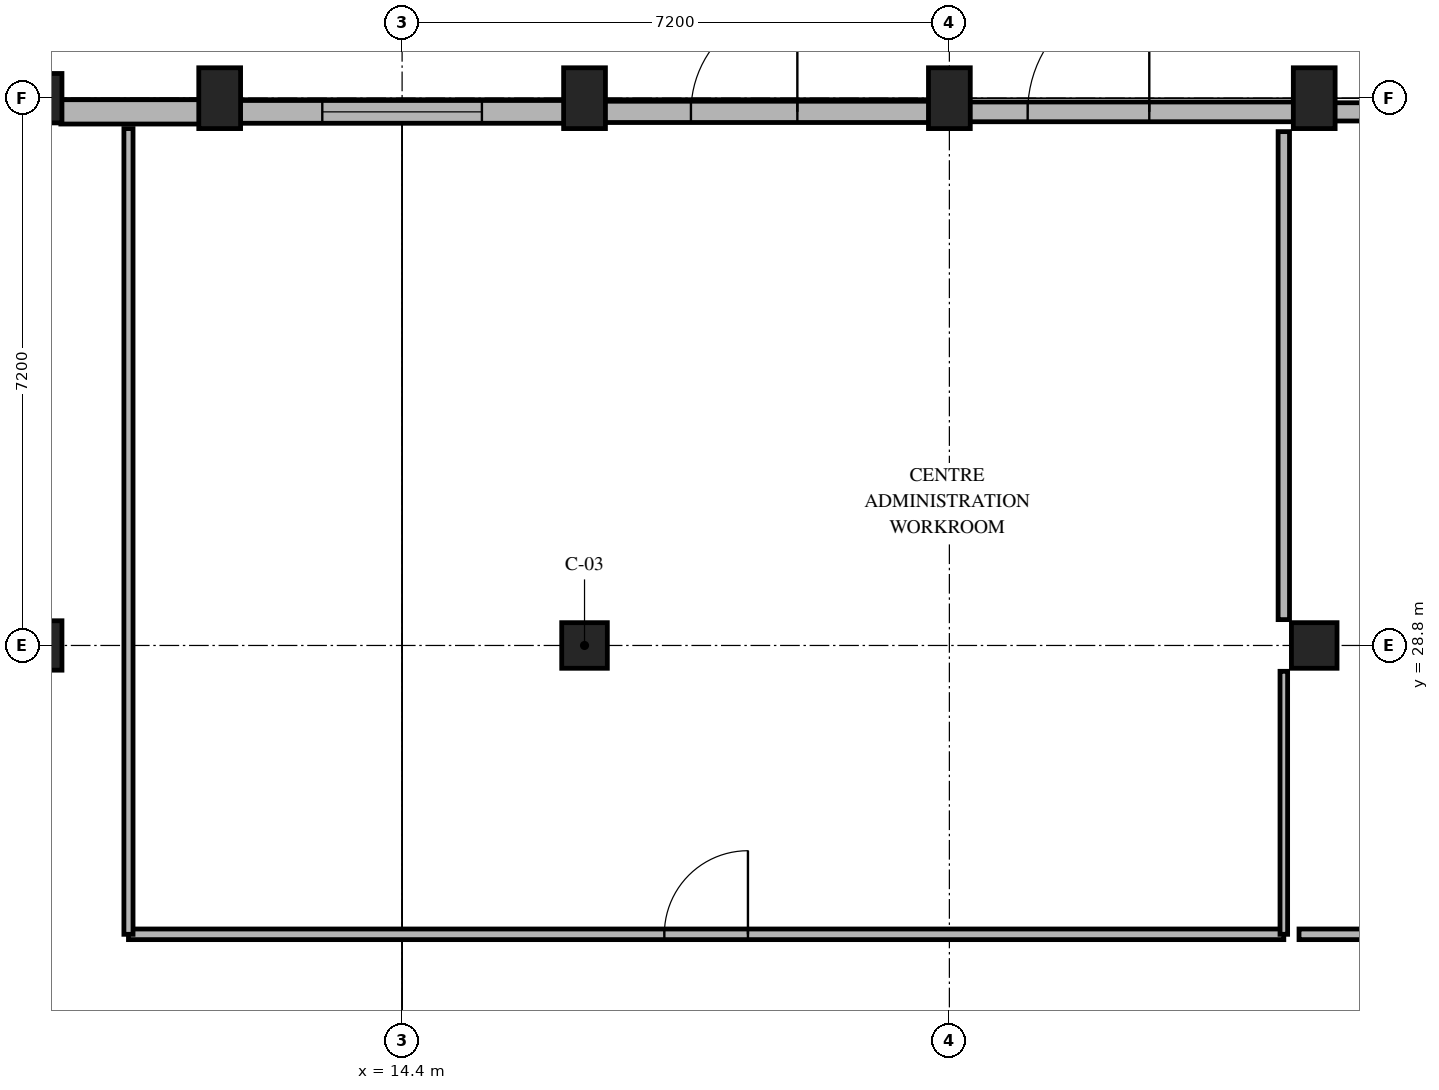
"""IFC4 building model, lengths in metres.
Left out: names, types, materials, properties, quantities, classifications, styles, units other than length and angle.
Written with IfcOpenShell. Run it as: python <this file> out.ifc"""

import sys

from ifc_helpers import new_model, si_unit, direction, frame, frame_2d, origin, origin_2d, place, context, subcontext, project, spatial, rectangle, extrude, element, fill, save


model = new_model("IFC4")
c1 = context("Model", 3, precision=1e-05, world=origin(), true_north=direction((0.0, 1.0)))
c2 = subcontext(c1, "Body", "Model", "MODEL_VIEW")
j1 = project(units=[si_unit("LENGTHUNIT", "METRE"), si_unit("PLANEANGLEUNIT", "RADIAN")], contexts=[c1])
p1 = place(None, origin())
s1 = spatial("IfcSite", under=j1, at=p1, CompositionType="ELEMENT")
p2 = place(p1, origin())
s2 = spatial("IfcBuilding", under=s1, at=p2, CompositionType="ELEMENT")
p3 = place(p2, origin())
s3 = spatial("IfcBuildingStorey", under=s2, at=p3, CompositionType="ELEMENT", Elevation=0.0)
for number, where, z_axis, x_axis in (
    (1, (9.6, 28.8, 0.0), (0.0, 0.0, 1.0), (1.0, 0.0, 0.0)),
    (2, (9.6, 36.0, 0.0), (0.0, 0.0, 1.0), (1.0, 0.0, 0.0)),
):
    element("IfcColumn", number, at=place(p3, frame(where, z_axis=z_axis, x_axis=x_axis)), inside=s3, PredefinedType="COLUMN", context=c2, shape_type="SweptSolid", body=[
        extrude(rectangle(XDim=0.65, YDim=0.65, at=origin_2d()), origin(), (0.0, 0.0, 1.0), 4.5),
    ])
for number, where, z_axis, x_axis in (
    (3, (12.0, 36.0, 0.0), (0.0, 0.0, 1.0), (1.0, 0.0, 0.0)),
    (4, (16.8, 36.0, 0.0), (0.0, 0.0, 1.0), (1.0, 0.0, 0.0)),
    (5, (21.6, 36.0, 0.0), (0.0, 0.0, 1.0), (1.0, 0.0, 0.0)),
    (6, (26.4, 36.0, 0.0), (0.0, 0.0, 1.0), (1.0, 0.0, 0.0)),
):
    element("IfcColumn", number, at=place(p3, frame(where, z_axis=z_axis, x_axis=x_axis)), inside=s3, PredefinedType="COLUMN", context=c2, shape_type="SweptSolid", body=[
        extrude(rectangle(XDim=0.55, YDim=0.8, at=origin_2d()), origin(), (0.0, 0.0, 1.0), 4.5),
    ])
for number, where, z_axis, x_axis in (
    (7, (16.8, 28.8, 0.0), (0.0, 0.0, 1.0), (1.0, 0.0, 0.0)),
    (8, (26.4, 28.8, 0.0), (0.0, 0.0, 1.0), (1.0, 0.0, 0.0)),
):
    element("IfcColumn", number, at=place(p3, frame(where, z_axis=z_axis, x_axis=x_axis)), inside=s3, PredefinedType="COLUMN", context=c2, shape_type="SweptSolid", body=[
        extrude(rectangle(XDim=0.6, YDim=0.6, at=origin_2d()), origin(), (0.0, 0.0, 1.0), 4.5),
    ])
p4 = place(p3, frame((9.91, 35.82, 0.0), z_axis=(0.0, 0.0, 1.0), x_axis=(1.0, 0.0, 0.0)))
e9 = element("IfcWall", 9, at=p4, inside=s3, PredefinedType="SOLIDWALL", context=c2, shape_type="SweptSolid", body=[
    extrude(rectangle(XDim=1.83, YDim=0.32, at=frame_2d((0.915, 0.0))), origin(), (0.0, 0.0, 1.0), 3.59),
])
p5 = place(p3, frame((12.26, 35.82, 0.0), z_axis=(0.0, 0.0, 1.0), x_axis=(1.0, 0.0, 0.0)))
e10 = element("IfcWall", 10, at=p5, inside=s3, PredefinedType="SOLIDWALL", context=c2, shape_type="SweptSolid", body=[
    extrude(rectangle(XDim=4.28, YDim=0.3, at=frame_2d((2.14, 0.0))), origin(), (0.0, 0.0, 1.0), 3.64),
])
p6 = place(p5, frame((1.09, 0.0, 0.9)))
e11 = element("IfcOpeningElement", 11, at=p6, cuts=e10, PredefinedType="OPENING", context=c2, shape_type="SweptSolid", body=[
    extrude(rectangle(XDim=2.1, YDim=1.35, at=frame_2d((1.05, 0.675))), frame((0.0, 0.16, 0.0), z_axis=(0.0, -1.0, 0.0), x_axis=(1.0, 0.0, 0.0)), (0.0, 0.0, 1.0), 0.32),
])
p7 = place(p3, frame((17.06, 35.82, 0.0), z_axis=(0.0, 0.0, 1.0), x_axis=(1.0, 0.0, 0.0)))
e12 = element("IfcWall", 12, at=p7, inside=s3, PredefinedType="SOLIDWALL", context=c2, shape_type="SweptSolid", body=[
    extrude(rectangle(XDim=4.28, YDim=0.28, at=frame_2d((2.14, 0.0))), origin(), (0.0, 0.0, 1.0), 3.44),
])
p8 = place(p7, frame((1.14, 0.0, 0.0)))
e13 = element("IfcOpeningElement", 13, at=p8, cuts=e12, PredefinedType="OPENING", context=c2, shape_type="SweptSolid", body=[
    extrude(rectangle(XDim=1.4, YDim=2.2, at=frame_2d((0.7, 1.1))), frame((0.0, 0.15, 0.0), z_axis=(0.0, -1.0, 0.0), x_axis=(1.0, 0.0, 0.0)), (0.0, 0.0, 1.0), 0.3),
])
p9 = place(p3, frame((21.86, 35.82, 0.0), z_axis=(0.0, 0.0, 1.0), x_axis=(1.0, 0.0, 0.0)))
e14 = element("IfcWall", 14, at=p9, inside=s3, PredefinedType="SOLIDWALL", context=c2, shape_type="SweptSolid", body=[
    extrude(rectangle(XDim=4.28, YDim=0.26, at=frame_2d((2.14, 0.0))), origin(), (0.0, 0.0, 1.0), 3.49),
])
p10 = place(p9, frame((0.77, 0.0, 0.0)))
e15 = element("IfcOpeningElement", 15, at=p10, cuts=e14, PredefinedType="OPENING", context=c2, shape_type="SweptSolid", body=[
    extrude(rectangle(XDim=1.6, YDim=2.3, at=frame_2d((0.8, 1.15))), frame((0.0, 0.14, 0.0), z_axis=(0.0, -1.0, 0.0), x_axis=(1.0, 0.0, 0.0)), (0.0, 0.0, 1.0), 0.28),
])
p11 = place(p3, frame((26.66, 35.82, 0.0), z_axis=(0.0, 0.0, 1.0), x_axis=(1.0, 0.0, 0.0)))
e16 = element("IfcWall", 16, at=p11, inside=s3, PredefinedType="SOLIDWALL", context=c2, shape_type="SweptSolid", body=[
    extrude(rectangle(XDim=4.28, YDim=0.24, at=frame_2d((2.14, 0.0))), origin(), (0.0, 0.0, 1.0), 3.54),
])
p12 = place(p11, frame((0.82, 0.0, 0.0)))
e17 = element("IfcOpeningElement", 17, at=p12, cuts=e16, PredefinedType="OPENING", context=c2, shape_type="SweptSolid", body=[
    extrude(rectangle(XDim=1.4, YDim=2.2, at=frame_2d((0.7, 1.1))), frame((0.0, 0.13, 0.0), z_axis=(0.0, -1.0, 0.0), x_axis=(1.0, 0.0, 0.0)), (0.0, 0.0, 1.0), 0.26),
])
p13 = place(p3, frame((10.8, 25.0, 0.0), z_axis=(0.0, 0.0, 1.0), x_axis=(1.0, 0.0, 0.0)))
e18 = element("IfcWall", 18, at=p13, inside=s3, PredefinedType="PARTITIONING", context=c2, shape_type="SweptSolid", body=[
    extrude(rectangle(XDim=15.2, YDim=0.14, at=frame_2d((7.6, 0.0))), origin(), (0.0, 0.0, 1.0), 3.44),
])
p14 = place(p13, frame((7.05, 0.0, 0.0)))
e19 = element("IfcOpeningElement", 19, at=p14, cuts=e18, PredefinedType="OPENING", context=c2, shape_type="SweptSolid", body=[
    extrude(rectangle(XDim=1.1, YDim=2.15, at=frame_2d((0.55, 1.075))), frame((0.0, 0.08, 0.0), z_axis=(0.0, -1.0, 0.0), x_axis=(1.0, 0.0, 0.0)), (0.0, 0.0, 1.0), 0.16),
])
p15 = place(p3, frame((10.8, 35.6, 0.0), z_axis=(0.0, 0.0, 1.0), x_axis=(0.0, -1.0, 0.0)))
e20 = element("IfcWall", 20, at=p15, inside=s3, PredefinedType="PARTITIONING", context=c2, shape_type="SweptSolid", body=[
    extrude(rectangle(XDim=10.6, YDim=0.12, at=frame_2d((5.3, 0.0))), origin(), (0.0, 0.0, 1.0), 3.49),
])
p16 = place(p3, frame((26.0, 25.0, 0.0), z_axis=(0.0, 0.0, 1.0), x_axis=(0.0, 1.0, 0.0)))
e21 = element("IfcWall", 21, at=p16, inside=s3, PredefinedType="PARTITIONING", context=c2, shape_type="SweptSolid", body=[
    extrude(rectangle(XDim=3.46, YDim=0.1, at=frame_2d((1.73, 0.0))), origin(), (0.0, 0.0, 1.0), 3.48),
])
p17 = place(p3, frame((26.0, 29.14, 0.0), z_axis=(0.0, 0.0, 1.0), x_axis=(0.0, 1.0, 0.0)))
e22 = element("IfcWall", 22, at=p17, inside=s3, PredefinedType="PARTITIONING", context=c2, shape_type="SweptSolid", body=[
    extrude(rectangle(XDim=6.42, YDim=0.15, at=frame_2d((3.21, 0.0))), origin(), (0.0, 0.0, 1.0), 3.69),
])
p18 = place(p3, frame((26.2, 25.0, 0.0), z_axis=(0.0, 0.0, 1.0), x_axis=(1.0, 0.0, 0.0)))
e23 = element("IfcWall", 23, at=p18, inside=s3, PredefinedType="PARTITIONING", context=c2, shape_type="SweptSolid", body=[
    extrude(rectangle(XDim=9.8, YDim=0.14, at=frame_2d((4.9, 0.0))), origin(), (0.0, 0.0, 1.0), 3.44),
])
p19 = place(p18, frame((4.4, 0.0, 0.0)))
e24 = element("IfcOpeningElement", 24, at=p19, cuts=e23, PredefinedType="OPENING", context=c2, shape_type="SweptSolid", body=[
    extrude(rectangle(XDim=1.0, YDim=2.15, at=frame_2d((0.5, 1.075))), frame((0.0, 0.08, 0.0), z_axis=(0.0, -1.0, 0.0), x_axis=(1.0, 0.0, 0.0)), (0.0, 0.0, 1.0), 0.16),
])
p20 = place(p6, origin())
e25 = element("IfcWindow", 25, at=p20, inside=s3, PartitioningType="SINGLE_PANEL", PredefinedType="WINDOW", context=c2, shape_type="SweptSolid", body=[
    extrude(rectangle(XDim=2.1, YDim=1.35, at=frame_2d((1.05, 0.675))), frame((0.0, 0.03, 0.0), z_axis=(0.0, -1.0, 0.0), x_axis=(1.0, 0.0, 0.0)), (0.0, 0.0, 1.0), 0.06),
])
fill(e11, e25)
p21 = place(p8, origin())
e26 = element("IfcDoor", 26, at=p21, inside=s3, OperationType="SINGLE_SWING_RIGHT", PredefinedType="DOOR", context=c2, shape_type="SweptSolid", body=[
    extrude(rectangle(XDim=1.4, YDim=2.2, at=frame_2d((0.7, 1.1))), frame((0.0, 0.025, 0.0), z_axis=(0.0, -1.0, 0.0), x_axis=(1.0, 0.0, 0.0)), (0.0, 0.0, 1.0), 0.05),
])
fill(e13, e26)
p22 = place(p10, origin())
e27 = element("IfcDoor", 27, at=p22, inside=s3, OperationType="SINGLE_SWING_RIGHT", PredefinedType="DOOR", context=c2, shape_type="SweptSolid", body=[
    extrude(rectangle(XDim=1.6, YDim=2.3, at=frame_2d((0.8, 1.15))), frame((0.0, 0.025, 0.0), z_axis=(0.0, -1.0, 0.0), x_axis=(1.0, 0.0, 0.0)), (0.0, 0.0, 1.0), 0.05),
])
fill(e15, e27)
p23 = place(p14, origin())
e28 = element("IfcDoor", 28, at=p23, inside=s3, OperationType="SINGLE_SWING_RIGHT", PredefinedType="DOOR", context=c2, shape_type="SweptSolid", body=[
    extrude(rectangle(XDim=1.1, YDim=2.15, at=frame_2d((0.55, 1.075))), frame((0.0, 0.025, 0.0), z_axis=(0.0, -1.0, 0.0), x_axis=(1.0, 0.0, 0.0)), (0.0, 0.0, 1.0), 0.05),
])
fill(e19, e28)
save(model, sys.argv[1])
